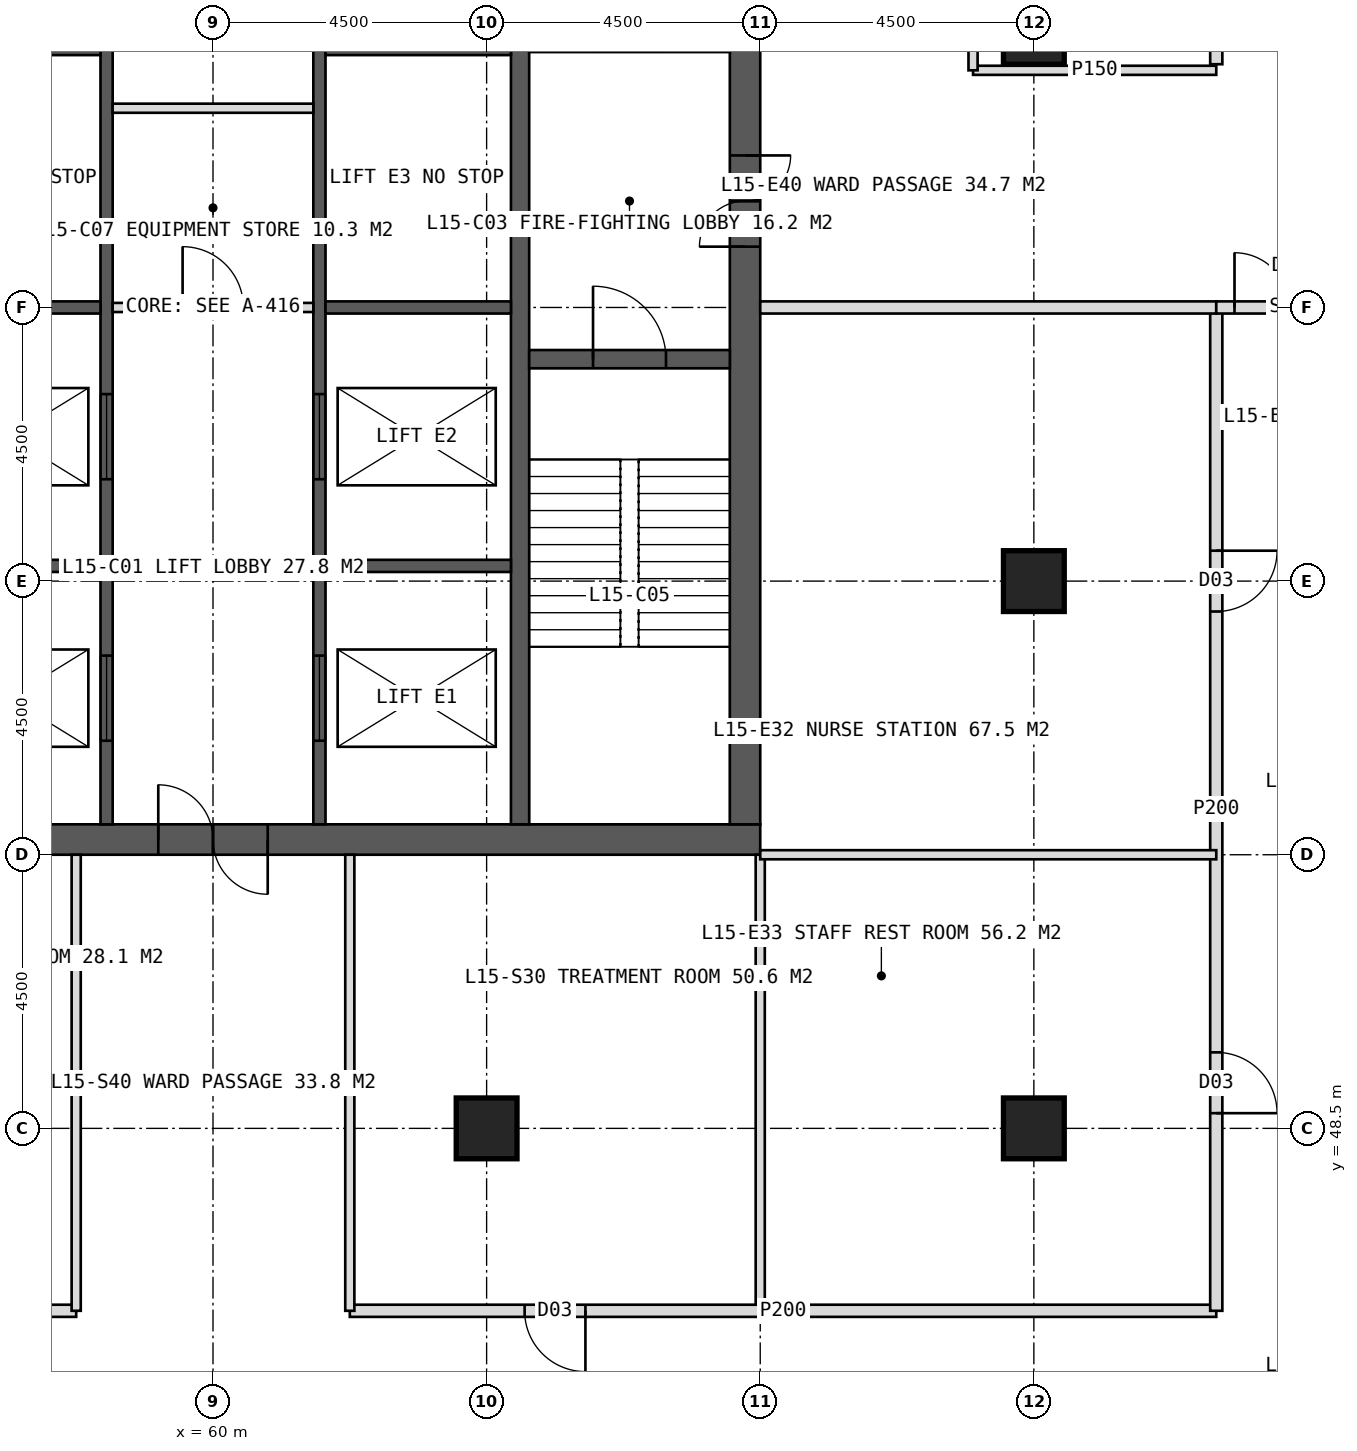
"""IFC4 building model, lengths in metres.
Left out: names, types, materials, properties, quantities, classifications, styles, units other than length and angle.
Written with IfcOpenShell. Run it as: python <this file> out.ifc"""

import sys

from ifc_helpers import new_model, si_unit, direction, frame, frame_2d, origin, origin_2d, place, context, subcontext, project, spatial, rectangle, hollow_rectangle, extrude, element, fill, save


model = new_model("IFC4")
c1 = context("Model", 3, precision=1e-05, world=origin(), true_north=direction((0.0, 1.0)))
c2 = subcontext(c1, "Body", "Model", "MODEL_VIEW")
j1 = project(units=[si_unit("LENGTHUNIT", "METRE"), si_unit("PLANEANGLEUNIT", "RADIAN")], contexts=[c1])
p1 = place(None, origin())
s1 = spatial("IfcSite", under=j1, at=p1, CompositionType="ELEMENT")
p2 = place(p1, origin())
s2 = spatial("IfcBuilding", under=s1, at=p2, CompositionType="ELEMENT")
p3 = place(p2, frame((0.0, 0.0, 67.0)))
s3 = spatial("IfcBuildingStorey", under=s2, at=p3, CompositionType="ELEMENT", Elevation=67.0)
p4 = place(p3, frame((51.0, 53.25, 0.0), z_axis=(0.0, 0.0, 1.0), x_axis=(1.0, 0.0, 0.0)))
e1 = element("IfcWall", 1, at=p4, inside=s3, PredefinedType="SHEAR", context=c2, shape_type="SweptSolid", body=[
    extrude(rectangle(XDim=18.0, YDim=0.5, at=frame_2d((9.0, 0.0))), origin(), (0.0, 0.0, 1.0), 4.0),
])
p5 = place(p4, frame((8.1, 0.0, 0.0)))
e2 = element("IfcOpeningElement", 2, at=p5, cuts=e1, PredefinedType="OPENING", context=c2, shape_type="SweptSolid", body=[
    extrude(rectangle(XDim=1.8, YDim=2.2, at=frame_2d((0.9, 1.1))), frame((0.0, 0.26, 0.0), z_axis=(0.0, -1.0, 0.0), x_axis=(1.0, 0.0, 0.0)), (0.0, 0.0, 1.0), 0.52),
])
p6 = place(p3, frame((68.75, 53.5, 0.0), z_axis=(0.0, 0.0, 1.0), x_axis=(0.0, 1.0, 0.0)))
e3 = element("IfcWall", 3, at=p6, inside=s3, PredefinedType="SHEAR", context=c2, shape_type="SweptSolid", body=[
    extrude(rectangle(XDim=17.0, YDim=0.5, at=frame_2d((8.5, 0.0))), origin(), (0.0, 0.0, 1.0), 4.0),
])
p7 = place(p6, frame((9.5, 0.0, 0.0)))
e4 = element("IfcOpeningElement", 4, at=p7, cuts=e3, PredefinedType="OPENING", context=c2, shape_type="SweptSolid", body=[
    extrude(rectangle(XDim=1.5, YDim=2.2, at=frame_2d((0.75, 1.1))), frame((0.0, 0.26, 0.0), z_axis=(0.0, -1.0, 0.0), x_axis=(1.0, 0.0, 0.0)), (0.0, 0.0, 1.0), 0.52),
])
p8 = place(p3, frame((65.05, 53.5, 0.0), z_axis=(0.0, 0.0, 1.0), x_axis=(0.0, 1.0, 0.0)))
e5 = element("IfcWall", 5, at=p8, inside=s3, PredefinedType="SHEAR", context=c2, shape_type="SweptSolid", body=[
    extrude(rectangle(XDim=17.0, YDim=0.3, at=frame_2d((8.5, 0.0))), origin(), (0.0, 0.0, 1.0), 4.0),
])
p9 = place(p3, frame((58.25, 53.5, 0.0), z_axis=(0.0, 0.0, 1.0), x_axis=(0.0, 1.0, 0.0)))
e6 = element("IfcWall", 6, at=p9, inside=s3, PredefinedType="SHEAR", context=c2, shape_type="SweptSolid", body=[
    extrude(rectangle(XDim=17.0, YDim=0.2, at=frame_2d((8.5, 0.0))), origin(), (0.0, 0.0, 1.0), 4.0),
])
p10 = place(p9, frame((1.375, 0.0, 0.0)))
e7 = element("IfcOpeningElement", 7, at=p10, cuts=e6, PredefinedType="OPENING", context=c2, shape_type="SweptSolid", body=[
    extrude(rectangle(XDim=1.4, YDim=2.2, at=frame_2d((0.7, 1.1))), frame((0.0, 0.11, 0.0), z_axis=(0.0, -1.0, 0.0), x_axis=(1.0, 0.0, 0.0)), (0.0, 0.0, 1.0), 0.22),
])
p11 = place(p9, frame((5.675, 0.0, 0.0)))
e8 = element("IfcOpeningElement", 8, at=p11, cuts=e6, PredefinedType="OPENING", context=c2, shape_type="SweptSolid", body=[
    extrude(rectangle(XDim=1.4, YDim=2.2, at=frame_2d((0.7, 1.1))), frame((0.0, 0.11, 0.0), z_axis=(0.0, -1.0, 0.0), x_axis=(1.0, 0.0, 0.0)), (0.0, 0.0, 1.0), 0.22),
])
p12 = place(p3, frame((61.75, 53.5, 0.0), z_axis=(0.0, 0.0, 1.0), x_axis=(0.0, 1.0, 0.0)))
e9 = element("IfcWall", 9, at=p12, inside=s3, PredefinedType="SHEAR", context=c2, shape_type="SweptSolid", body=[
    extrude(rectangle(XDim=17.0, YDim=0.2, at=frame_2d((8.5, 0.0))), origin(), (0.0, 0.0, 1.0), 4.0),
])
p13 = place(p12, frame((1.375, 0.0, 0.0)))
e10 = element("IfcOpeningElement", 10, at=p13, cuts=e9, PredefinedType="OPENING", context=c2, shape_type="SweptSolid", body=[
    extrude(rectangle(XDim=1.4, YDim=2.2, at=frame_2d((0.7, 1.1))), frame((0.0, 0.11, 0.0), z_axis=(0.0, -1.0, 0.0), x_axis=(1.0, 0.0, 0.0)), (0.0, 0.0, 1.0), 0.22),
])
p14 = place(p12, frame((5.675, 0.0, 0.0)))
e11 = element("IfcOpeningElement", 11, at=p14, cuts=e9, PredefinedType="OPENING", context=c2, shape_type="SweptSolid", body=[
    extrude(rectangle(XDim=1.4, YDim=2.2, at=frame_2d((0.7, 1.1))), frame((0.0, 0.11, 0.0), z_axis=(0.0, -1.0, 0.0), x_axis=(1.0, 0.0, 0.0)), (0.0, 0.0, 1.0), 0.22),
])
for number, where, z_axis, x_axis in (
    (12, (55.1, 57.75, 0.0), (0.0, 0.0, 1.0), (1.0, 0.0, 0.0)),
    (13, (61.85, 57.75, 0.0), (0.0, 0.0, 1.0), (1.0, 0.0, 0.0)),
    (14, (55.1, 62.0, 0.0), (0.0, 0.0, 1.0), (1.0, 0.0, 0.0)),
    (15, (61.85, 62.0, 0.0), (0.0, 0.0, 1.0), (1.0, 0.0, 0.0)),
    (16, (55.1, 66.25, 0.0), (0.0, 0.0, 1.0), (1.0, 0.0, 0.0)),
    (17, (61.85, 66.25, 0.0), (0.0, 0.0, 1.0), (1.0, 0.0, 0.0)),
):
    element("IfcWall", number, at=place(p3, frame(where, z_axis=z_axis, x_axis=x_axis)), inside=s3, PredefinedType="SHEAR", context=c2, shape_type="SweptSolid", body=[
        extrude(rectangle(XDim=3.05, YDim=0.2, at=frame_2d((1.525, 0.0))), origin(), (0.0, 0.0, 1.0), 4.0),
    ])
p15 = place(p3, frame((65.2, 61.15, 0.0), z_axis=(0.0, 0.0, 1.0), x_axis=(1.0, 0.0, 0.0)))
e18 = element("IfcWall", 18, at=p15, inside=s3, PredefinedType="SHEAR", context=c2, shape_type="SweptSolid", body=[
    extrude(rectangle(XDim=3.3, YDim=0.3, at=frame_2d((1.65, 0.0))), origin(), (0.0, 0.0, 1.0), 4.0),
])
p16 = place(p15, frame((1.05, 0.0, 0.0)))
e19 = element("IfcOpeningElement", 19, at=p16, cuts=e18, PredefinedType="OPENING", context=c2, shape_type="SweptSolid", body=[
    extrude(rectangle(XDim=1.2, YDim=2.1, at=frame_2d((0.6, 1.05))), frame((0.0, 0.16, 0.0), z_axis=(0.0, -1.0, 0.0), x_axis=(1.0, 0.0, 0.0)), (0.0, 0.0, 1.0), 0.32),
])
p17 = place(p3, frame((65.2, 66.35, 0.0), z_axis=(0.0, 0.0, 1.0), x_axis=(1.0, 0.0, 0.0)))
e20 = element("IfcWall", 20, at=p17, inside=s3, PredefinedType="SHEAR", context=c2, shape_type="SweptSolid", body=[
    extrude(rectangle(XDim=3.3, YDim=0.3, at=frame_2d((1.65, 0.0))), origin(), (0.0, 0.0, 1.0), 4.0),
])
p18 = place(p17, frame((1.05, 0.0, 0.0)))
e21 = element("IfcOpeningElement", 21, at=p18, cuts=e20, PredefinedType="OPENING", context=c2, shape_type="SweptSolid", body=[
    extrude(rectangle(XDim=1.2, YDim=2.2, at=frame_2d((0.6, 1.1))), frame((0.0, 0.16, 0.0), z_axis=(0.0, -1.0, 0.0), x_axis=(1.0, 0.0, 0.0)), (0.0, 0.0, 1.0), 0.32),
])
for number, where, z_axis, x_axis in (
    (22, (73.5, 48.5, 0.0), (0.0, 0.0, 1.0), (1.0, 0.0, 0.0)),
    (23, (64.5, 48.5, 0.0), (0.0, 0.0, 1.0), (1.0, 0.0, 0.0)),
    (24, (73.5, 57.5, 0.0), (0.0, 0.0, 1.0), (1.0, 0.0, 0.0)),
    (25, (73.5, 66.5, 0.0), (0.0, 0.0, 1.0), (1.0, 0.0, 0.0)),
):
    element("IfcColumn", number, at=place(p3, frame(where, z_axis=z_axis, x_axis=x_axis)), inside=s3, PredefinedType="COLUMN", context=c2, shape_type="SweptSolid", body=[
        extrude(hollow_rectangle(XDim=1.0, YDim=1.0, WallThickness=0.1, at=origin_2d()), origin(), (0.0, 0.0, 1.0), 4.0),
    ])
p19 = place(p3, frame((69.0, 53.0, 0.0), z_axis=(0.0, 0.0, 1.0), x_axis=(0.0, -1.0, 0.0)))
e26 = element("IfcWall", 26, at=p19, inside=s3, PredefinedType="PARTITIONING", context=c2, shape_type="SweptSolid", body=[
    extrude(rectangle(XDim=7.5, YDim=0.15, at=frame_2d((3.75, 0.0))), origin(), (0.0, 0.0, 1.0), 3.75),
])
p20 = place(p3, frame((76.5, 45.5, 0.0), z_axis=(0.0, 0.0, 1.0), x_axis=(-1.0, 0.0, 0.0)))
e27 = element("IfcWall", 27, at=p20, inside=s3, PredefinedType="PARTITIONING", context=c2, shape_type="SweptSolid", body=[
    extrude(rectangle(XDim=14.25, YDim=0.2, at=frame_2d((7.125, 0.0))), origin(), (0.0, 0.0, 1.0), 3.75),
])
p21 = place(p20, frame((10.375, 0.0, 0.0)))
e28 = element("IfcOpeningElement", 28, at=p21, cuts=e27, PredefinedType="OPENING", context=c2, shape_type="SweptSolid", body=[
    extrude(rectangle(XDim=1.0, YDim=2.1, at=frame_2d((0.5, 1.05))), frame((0.0, 0.11, 0.0), z_axis=(0.0, -1.0, 0.0), x_axis=(1.0, 0.0, 0.0)), (0.0, 0.0, 1.0), 0.22),
])
p22 = place(p3, frame((57.75, 45.5, 0.0), z_axis=(0.0, 0.0, 1.0), x_axis=(-1.0, 0.0, 0.0)))
e29 = element("IfcWall", 29, at=p22, inside=s3, PredefinedType="PARTITIONING", context=c2, shape_type="SweptSolid", body=[
    extrude(rectangle(XDim=14.25, YDim=0.2, at=frame_2d((7.125, 0.0))), origin(), (0.0, 0.0, 1.0), 3.75),
])
p23 = place(p22, frame((1.375, 0.0, 0.0)))
e30 = element("IfcOpeningElement", 30, at=p23, cuts=e29, PredefinedType="OPENING", context=c2, shape_type="SweptSolid", body=[
    extrude(rectangle(XDim=1.0, YDim=2.1, at=frame_2d((0.5, 1.05))), frame((0.0, 0.11, 0.0), z_axis=(0.0, -1.0, 0.0), x_axis=(1.0, 0.0, 0.0)), (0.0, 0.0, 1.0), 0.22),
])
p24 = place(p22, frame((5.5, 0.0, 0.0)))
e31 = element("IfcOpeningElement", 31, at=p24, cuts=e29, PredefinedType="OPENING", context=c2, shape_type="SweptSolid", body=[
    extrude(rectangle(XDim=1.0, YDim=2.1, at=frame_2d((0.5, 1.05))), frame((0.0, 0.11, 0.0), z_axis=(0.0, -1.0, 0.0), x_axis=(1.0, 0.0, 0.0)), (0.0, 0.0, 1.0), 0.22),
])
p25 = place(p22, frame((10.75, 0.0, 0.0)))
e32 = element("IfcOpeningElement", 32, at=p25, cuts=e29, PredefinedType="OPENING", context=c2, shape_type="SweptSolid", body=[
    extrude(rectangle(XDim=1.0, YDim=2.1, at=frame_2d((0.5, 1.05))), frame((0.0, 0.11, 0.0), z_axis=(0.0, -1.0, 0.0), x_axis=(1.0, 0.0, 0.0)), (0.0, 0.0, 1.0), 0.22),
])
for number, where, z_axis, x_axis in (
    (33, (62.25, 53.0, 0.0), (0.0, 0.0, 1.0), (0.0, -1.0, 0.0)),
    (34, (57.75, 53.0, 0.0), (0.0, 0.0, 1.0), (0.0, -1.0, 0.0)),
):
    element("IfcWall", number, at=place(p3, frame(where, z_axis=z_axis, x_axis=x_axis)), inside=s3, PredefinedType="PARTITIONING", context=c2, shape_type="SweptSolid", body=[
        extrude(rectangle(XDim=7.5, YDim=0.15, at=frame_2d((3.75, 0.0))), origin(), (0.0, 0.0, 1.0), 3.75),
    ])
p26 = place(p3, frame((76.5, 78.5, 0.0), z_axis=(0.0, 0.0, 1.0), x_axis=(0.0, -1.0, 0.0)))
e35 = element("IfcWall", 35, at=p26, inside=s3, PredefinedType="PARTITIONING", context=c2, shape_type="SweptSolid", body=[
    extrude(rectangle(XDim=12.5, YDim=0.2, at=frame_2d((6.25, 0.0))), origin(), (0.0, 0.0, 1.0), 3.75),
])
p27 = place(p26, frame((8.3, 0.0, 0.0)))
e36 = element("IfcOpeningElement", 36, at=p27, cuts=e35, PredefinedType="OPENING", context=c2, shape_type="SweptSolid", body=[
    extrude(rectangle(XDim=0.9, YDim=2.1, at=frame_2d((0.45, 1.05))), frame((0.0, 0.11, 0.0), z_axis=(0.0, -1.0, 0.0), x_axis=(1.0, 0.0, 0.0)), (0.0, 0.0, 1.0), 0.22),
])
p28 = place(p26, frame((10.8, 0.0, 0.0)))
e37 = element("IfcOpeningElement", 37, at=p28, cuts=e35, PredefinedType="OPENING", context=c2, shape_type="SweptSolid", body=[
    extrude(rectangle(XDim=0.9, YDim=2.1, at=frame_2d((0.45, 1.05))), frame((0.0, 0.11, 0.0), z_axis=(0.0, -1.0, 0.0), x_axis=(1.0, 0.0, 0.0)), (0.0, 0.0, 1.0), 0.22),
])
p29 = place(p3, frame((76.5, 62.0, 0.0), z_axis=(0.0, 0.0, 1.0), x_axis=(0.0, -1.0, 0.0)))
e38 = element("IfcWall", 38, at=p29, inside=s3, PredefinedType="PARTITIONING", context=c2, shape_type="SweptSolid", body=[
    extrude(rectangle(XDim=16.5, YDim=0.2, at=frame_2d((8.25, 0.0))), origin(), (0.0, 0.0, 1.0), 3.75),
])
p30 = place(p29, frame((4.0, 0.0, 0.0)))
e39 = element("IfcOpeningElement", 39, at=p30, cuts=e38, PredefinedType="OPENING", context=c2, shape_type="SweptSolid", body=[
    extrude(rectangle(XDim=1.0, YDim=2.1, at=frame_2d((0.5, 1.05))), frame((0.0, 0.11, 0.0), z_axis=(0.0, -1.0, 0.0), x_axis=(1.0, 0.0, 0.0)), (0.0, 0.0, 1.0), 0.22),
])
p31 = place(p29, frame((12.25, 0.0, 0.0)))
e40 = element("IfcOpeningElement", 40, at=p31, cuts=e38, PredefinedType="OPENING", context=c2, shape_type="SweptSolid", body=[
    extrude(rectangle(XDim=1.0, YDim=2.1, at=frame_2d((0.5, 1.05))), frame((0.0, 0.11, 0.0), z_axis=(0.0, -1.0, 0.0), x_axis=(1.0, 0.0, 0.0)), (0.0, 0.0, 1.0), 0.22),
])
p32 = place(p3, frame((72.5, 65.9, 0.0), z_axis=(0.0, 0.0, 1.0), x_axis=(1.0, 0.0, 0.0)))
e41 = element("IfcWall", 41, at=p32, inside=s3, PredefinedType="PARTITIONING", context=c2, shape_type="SweptSolid", body=[
    extrude(rectangle(XDim=4.0, YDim=0.15, at=frame_2d((2.0, 0.0))), origin(), (0.0, 0.0, 1.0), 3.75),
])
p33 = place(p3, frame((69.0, 62.0, 0.0), z_axis=(0.0, 0.0, 1.0), x_axis=(1.0, 0.0, 0.0)))
e42 = element("IfcWall", 42, at=p33, inside=s3, PredefinedType="SOLIDWALL", context=c2, shape_type="SweptSolid", body=[
    extrude(rectangle(XDim=7.5, YDim=0.2, at=frame_2d((3.75, 0.0))), origin(), (0.0, 0.0, 1.0), 2.75),
])
p34 = place(p3, frame((69.0, 53.0, 0.0), z_axis=(0.0, 0.0, 1.0), x_axis=(1.0, 0.0, 0.0)))
e43 = element("IfcWall", 43, at=p34, inside=s3, PredefinedType="PARTITIONING", context=c2, shape_type="SweptSolid", body=[
    extrude(rectangle(XDim=7.5, YDim=0.15, at=frame_2d((3.75, 0.0))), origin(), (0.0, 0.0, 1.0), 3.75),
])
p35 = place(p3, frame((76.5, 62.0, 0.0), z_axis=(0.0, 0.0, 1.0), x_axis=(1.0, 0.0, 0.0)))
e44 = element("IfcWall", 44, at=p35, inside=s3, PredefinedType="SOLIDWALL", context=c2, shape_type="SweptSolid", body=[
    extrude(rectangle(XDim=2.7, YDim=0.2, at=frame_2d((1.35, 0.0))), origin(), (0.0, 0.0, 1.0), 2.75),
])
p36 = place(p35, frame((0.3, 0.0, 0.0)))
e45 = element("IfcOpeningElement", 45, at=p36, cuts=e44, PredefinedType="OPENING", context=c2, shape_type="SweptSolid", body=[
    extrude(rectangle(XDim=1.8, YDim=2.2, at=frame_2d((0.9, 1.1))), frame((0.0, 0.11, 0.0), z_axis=(0.0, -1.0, 0.0), x_axis=(1.0, 0.0, 0.0)), (0.0, 0.0, 1.0), 0.22),
])
p37 = place(p3, frame((58.35, 62.0, 0.0), z_axis=(0.0, 0.0, 1.0), x_axis=(1.0, 0.0, 0.0)))
e46 = element("IfcWall", 46, at=p37, inside=s3, PredefinedType="PARTITIONING", context=c2, shape_type="SweptSolid", body=[
    extrude(rectangle(XDim=3.3, YDim=0.15, at=frame_2d((1.65, 0.0))), origin(), (0.0, 0.0, 1.0), 3.75),
])
p38 = place(p37, frame((1.15, 0.0, 0.0)))
e47 = element("IfcOpeningElement", 47, at=p38, cuts=e46, PredefinedType="OPENING", context=c2, shape_type="SweptSolid", body=[
    extrude(rectangle(XDim=1.0, YDim=2.1, at=frame_2d((0.5, 1.05))), frame((0.0, 0.085, 0.0), z_axis=(0.0, -1.0, 0.0), x_axis=(1.0, 0.0, 0.0)), (0.0, 0.0, 1.0), 0.17),
])
p39 = place(p3, frame((58.35, 65.277, 0.0), z_axis=(0.0, 0.0, 1.0), x_axis=(1.0, 0.0, 0.0)))
e48 = element("IfcWall", 48, at=p39, inside=s3, PredefinedType="PARTITIONING", context=c2, shape_type="SweptSolid", body=[
    extrude(rectangle(XDim=3.3, YDim=0.15, at=frame_2d((1.65, 0.0))), origin(), (0.0, 0.0, 1.0), 3.75),
])
p40 = place(p3, frame((72.5, 65.9, 0.0), z_axis=(0.0, 0.0, 1.0), x_axis=(0.0, 1.0, 0.0)))
e49 = element("IfcWall", 49, at=p40, inside=s3, PredefinedType="PARTITIONING", context=c2, shape_type="SweptSolid", body=[
    extrude(rectangle(XDim=1.45, YDim=0.15, at=frame_2d((0.725, 0.0))), origin(), (0.0, 0.0, 1.0), 3.75),
])
p41 = place(p21, origin())
e50 = element("IfcDoor", 50, at=p41, inside=s3, OperationType="SINGLE_SWING_LEFT", PredefinedType="DOOR", context=c2, shape_type="SweptSolid", body=[
    extrude(rectangle(XDim=1.0, YDim=2.1, at=frame_2d((0.5, 1.05))), frame((0.0, 0.025, 0.0), z_axis=(0.0, -1.0, 0.0), x_axis=(1.0, 0.0, 0.0)), (0.0, 0.0, 1.0), 0.05),
])
fill(e28, e50)
p42 = place(p30, origin())
e51 = element("IfcDoor", 51, at=p42, inside=s3, OperationType="SINGLE_SWING_LEFT", PredefinedType="DOOR", context=c2, shape_type="SweptSolid", body=[
    extrude(rectangle(XDim=1.0, YDim=2.1, at=frame_2d((0.5, 1.05))), frame((0.0, 0.025, 0.0), z_axis=(0.0, -1.0, 0.0), x_axis=(1.0, 0.0, 0.0)), (0.0, 0.0, 1.0), 0.05),
])
fill(e39, e51)
p43 = place(p31, origin())
e52 = element("IfcDoor", 52, at=p43, inside=s3, OperationType="SINGLE_SWING_RIGHT", PredefinedType="DOOR", context=c2, shape_type="SweptSolid", body=[
    extrude(rectangle(XDim=1.0, YDim=2.1, at=frame_2d((0.5, 1.05))), frame((0.0, 0.025, 0.0), z_axis=(0.0, -1.0, 0.0), x_axis=(1.0, 0.0, 0.0)), (0.0, 0.0, 1.0), 0.05),
])
fill(e40, e52)
p44 = place(p36, origin())
e53 = element("IfcDoor", 53, at=p44, inside=s3, OperationType="DOUBLE_DOOR_DOUBLE_SWING", PredefinedType="DOOR", context=c2, shape_type="SweptSolid", body=[
    extrude(rectangle(XDim=1.8, YDim=2.2, at=frame_2d((0.9, 1.1))), frame((0.0, 0.025, 0.0), z_axis=(0.0, -1.0, 0.0), x_axis=(1.0, 0.0, 0.0)), (0.0, 0.0, 1.0), 0.05),
])
fill(e45, e53)
p45 = place(p5, origin())
e54 = element("IfcDoor", 54, at=p45, inside=s3, OperationType="DOUBLE_DOOR_SINGLE_SWING", PredefinedType="DOOR", context=c2, shape_type="SweptSolid", body=[
    extrude(rectangle(XDim=1.8, YDim=2.2, at=frame_2d((0.9, 1.1))), frame((0.0, 0.025, 0.0), z_axis=(0.0, -1.0, 0.0), x_axis=(1.0, 0.0, 0.0)), (0.0, 0.0, 1.0), 0.05),
])
fill(e2, e54)
p46 = place(p7, origin())
e55 = element("IfcDoor", 55, at=p46, inside=s3, OperationType="DOUBLE_DOOR_SINGLE_SWING", PredefinedType="DOOR", context=c2, shape_type="SweptSolid", body=[
    extrude(rectangle(XDim=1.5, YDim=2.2, at=frame_2d((0.75, 1.1))), frame((0.0, 0.025, 0.0), z_axis=(0.0, -1.0, 0.0), x_axis=(1.0, 0.0, 0.0)), (0.0, 0.0, 1.0), 0.05),
])
fill(e4, e55)
p47 = place(p16, origin())
e56 = element("IfcDoor", 56, at=p47, inside=s3, OperationType="SINGLE_SWING_LEFT", PredefinedType="DOOR", context=c2, shape_type="SweptSolid", body=[
    extrude(rectangle(XDim=1.2, YDim=2.1, at=frame_2d((0.6, 1.05))), frame((0.0, 0.025, 0.0), z_axis=(0.0, -1.0, 0.0), x_axis=(1.0, 0.0, 0.0)), (0.0, 0.0, 1.0), 0.05),
])
fill(e19, e56)
p48 = place(p10, origin())
e57 = element("IfcDoor", 57, at=p48, inside=s3, OperationType="SLIDING_TO_LEFT", PredefinedType="DOOR", context=c2, shape_type="SweptSolid", body=[
    extrude(rectangle(XDim=1.4, YDim=2.2, at=frame_2d((0.7, 1.1))), frame((0.0, 0.025, 0.0), z_axis=(0.0, -1.0, 0.0), x_axis=(1.0, 0.0, 0.0)), (0.0, 0.0, 1.0), 0.05),
])
fill(e7, e57)
p49 = place(p13, origin())
e58 = element("IfcDoor", 58, at=p49, inside=s3, OperationType="SLIDING_TO_LEFT", PredefinedType="DOOR", context=c2, shape_type="SweptSolid", body=[
    extrude(rectangle(XDim=1.4, YDim=2.2, at=frame_2d((0.7, 1.1))), frame((0.0, 0.025, 0.0), z_axis=(0.0, -1.0, 0.0), x_axis=(1.0, 0.0, 0.0)), (0.0, 0.0, 1.0), 0.05),
])
fill(e10, e58)
p50 = place(p11, origin())
e59 = element("IfcDoor", 59, at=p50, inside=s3, OperationType="SLIDING_TO_LEFT", PredefinedType="DOOR", context=c2, shape_type="SweptSolid", body=[
    extrude(rectangle(XDim=1.4, YDim=2.2, at=frame_2d((0.7, 1.1))), frame((0.0, 0.025, 0.0), z_axis=(0.0, -1.0, 0.0), x_axis=(1.0, 0.0, 0.0)), (0.0, 0.0, 1.0), 0.05),
])
fill(e8, e59)
p51 = place(p14, origin())
e60 = element("IfcDoor", 60, at=p51, inside=s3, OperationType="SLIDING_TO_LEFT", PredefinedType="DOOR", context=c2, shape_type="SweptSolid", body=[
    extrude(rectangle(XDim=1.4, YDim=2.2, at=frame_2d((0.7, 1.1))), frame((0.0, 0.025, 0.0), z_axis=(0.0, -1.0, 0.0), x_axis=(1.0, 0.0, 0.0)), (0.0, 0.0, 1.0), 0.05),
])
fill(e11, e60)
p52 = place(p38, origin())
e61 = element("IfcDoor", 61, at=p52, inside=s3, OperationType="SINGLE_SWING_LEFT", PredefinedType="DOOR", context=c2, shape_type="SweptSolid", body=[
    extrude(rectangle(XDim=1.0, YDim=2.1, at=frame_2d((0.5, 1.05))), frame((0.0, 0.025, 0.0), z_axis=(0.0, -1.0, 0.0), x_axis=(1.0, 0.0, 0.0)), (0.0, 0.0, 1.0), 0.05),
])
fill(e47, e61)
save(model, sys.argv[1])
